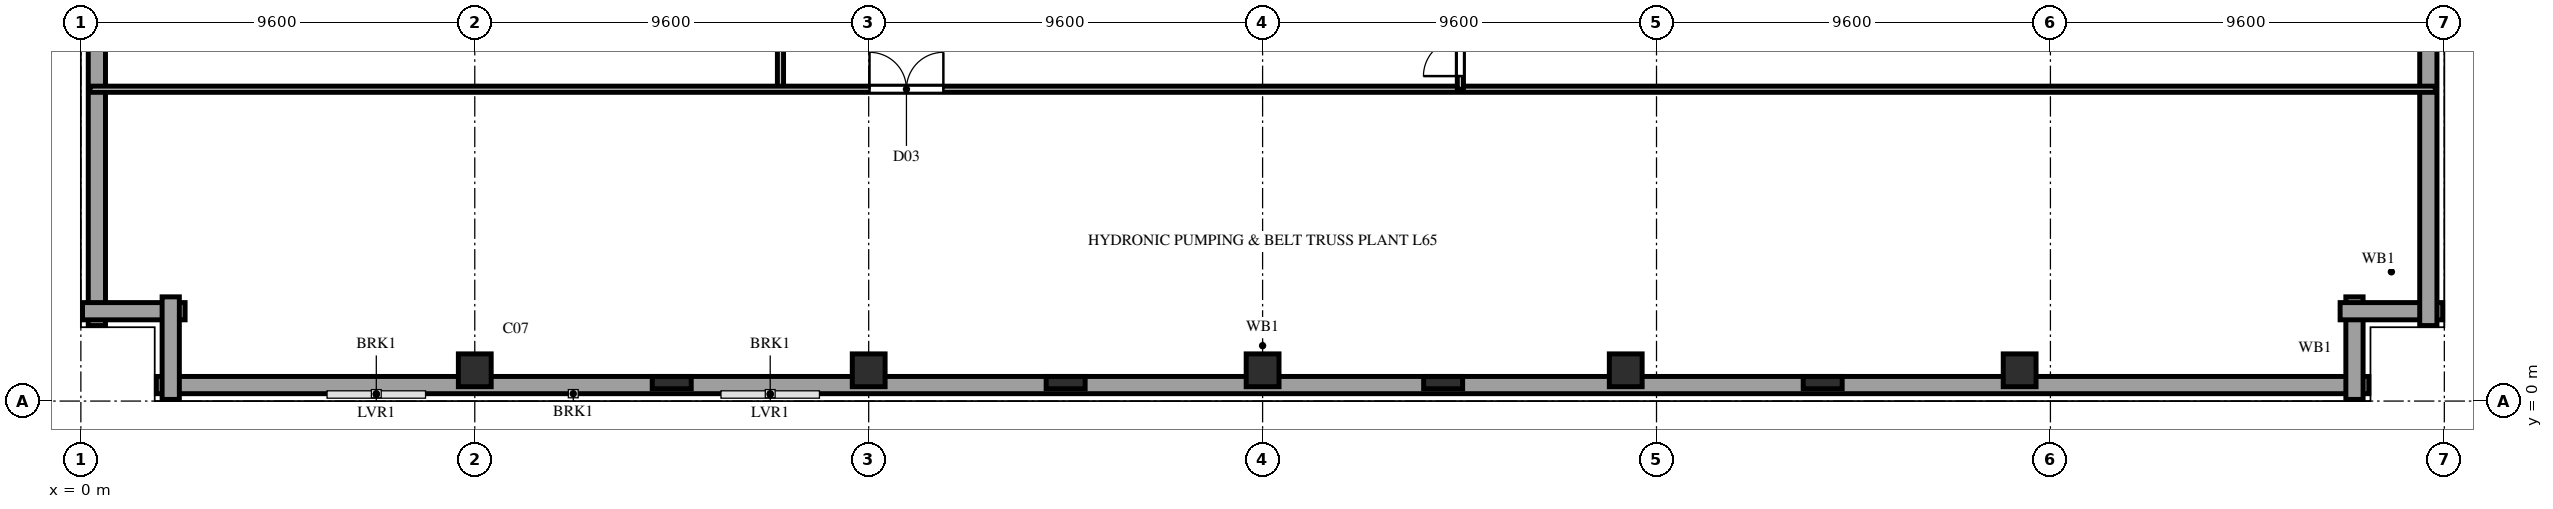
"""IFC4 building model, lengths in metres.
Left out: names, types, materials, properties, quantities, classifications, styles, units other than length and angle.
Written with IfcOpenShell. Run it as: python <this file> out.ifc"""

import sys

from ifc_helpers import new_model, si_unit, direction, frame, frame_2d, origin, origin_2d, place, context, subcontext, project, spatial, rectangle, extrude, element, fill, save


model = new_model("IFC4")
c1 = context("Model", 3, precision=1e-05, world=origin(), true_north=direction((0.0, 1.0)))
c2 = subcontext(c1, "Body", "Model", "MODEL_VIEW")
j1 = project(units=[si_unit("LENGTHUNIT", "METRE"), si_unit("PLANEANGLEUNIT", "RADIAN")], contexts=[c1])
p1 = place(None, origin())
s1 = spatial("IfcSite", under=j1, at=p1, CompositionType="ELEMENT")
p2 = place(p1, origin())
s2 = spatial("IfcBuilding", under=s1, at=p2, CompositionType="ELEMENT")
p3 = place(p2, frame((0.0, 0.0, 256.0)))
s3 = spatial("IfcBuildingStorey", under=s2, at=p3, CompositionType="ELEMENT", Elevation=256.0)
for number, where, z_axis, x_axis in (
    (1, (9.6, 0.75, 0.0), (0.0, 0.0, 1.0), (1.0, 0.0, 0.0)),
    (2, (19.2, 0.75, 0.0), (0.0, 0.0, 1.0), (1.0, 0.0, 0.0)),
    (3, (28.8, 0.75, 0.0), (0.0, 0.0, 1.0), (1.0, 0.0, 0.0)),
    (4, (37.65, 0.75, 0.0), (0.0, 0.0, 1.0), (1.0, 0.0, 0.0)),
    (5, (47.25, 0.75, 0.0), (0.0, 0.0, 1.0), (1.0, 0.0, 0.0)),
):
    element("IfcColumn", number, at=place(p3, frame(where, z_axis=z_axis, x_axis=x_axis)), inside=s3, PredefinedType="COLUMN", context=c2, shape_type="SweptSolid", body=[
        extrude(rectangle(XDim=0.8, YDim=0.8, at=origin_2d()), origin(), (0.0, 0.0, 1.0), 5.0),
    ])
for number, where, z_axis, x_axis in (
    (6, (14.4, 0.45, 0.0), (0.0, 0.0, 1.0), (1.0, 0.0, 0.0)),
    (7, (24.0, 0.45, 0.0), (0.0, 0.0, 1.0), (1.0, 0.0, 0.0)),
    (8, (33.2, 0.45, 0.0), (0.0, 0.0, 1.0), (1.0, 0.0, 0.0)),
    (9, (42.45, 0.45, 0.0), (0.0, 0.0, 1.0), (1.0, 0.0, 0.0)),
):
    element("IfcColumn", number, at=place(p3, frame(where, z_axis=z_axis, x_axis=x_axis)), inside=s3, PredefinedType="PILASTER", context=c2, shape_type="SweptSolid", body=[
        extrude(rectangle(XDim=0.95, YDim=0.3, at=origin_2d()), origin(), (0.0, 0.0, 1.0), 5.0),
    ])
p4 = place(p3, frame((1.84, 0.39, 0.0), z_axis=(0.0, 0.0, 1.0), x_axis=(1.0, 0.0, 0.0)))
e10 = element("IfcWall", 10, at=p4, inside=s3, PredefinedType="SOLIDWALL", context=c2, shape_type="SweptSolid", body=[
    extrude(rectangle(XDim=53.92, YDim=0.42, at=frame_2d((26.96, 0.0))), origin(), (0.0, 0.0, 1.0), 4.74),
])
for number, where, z_axis, x_axis in (
    (11, (55.41, 0.04, 0.0), (0.0, 0.0, 1.0), (0.0, 1.0, 0.0)),
    (12, (55.06, 2.19, 0.0), (0.0, 0.0, 1.0), (1.0, 0.0, 0.0)),
):
    element("IfcWall", number, at=place(p3, frame(where, z_axis=z_axis, x_axis=x_axis)), inside=s3, PredefinedType="SOLIDWALL", context=c2, shape_type="SweptSolid", body=[
        extrude(rectangle(XDim=2.5, YDim=0.42, at=frame_2d((1.25, 0.0))), origin(), (0.0, 0.0, 1.0), 4.7),
    ])
p5 = place(p3, frame((57.21, 1.84, 0.0), z_axis=(0.0, 0.0, 1.0), x_axis=(0.0, 1.0, 0.0)))
e13 = element("IfcWall", 13, at=p5, inside=s3, PredefinedType="SOLIDWALL", context=c2, shape_type="SweptSolid", body=[
    extrude(rectangle(XDim=34.72, YDim=0.42, at=frame_2d((17.36, 0.0))), origin(), (0.0, 0.0, 1.0), 4.7),
])
p6 = place(p3, frame((0.39, 55.76, 0.0), z_axis=(0.0, 0.0, 1.0), x_axis=(0.0, -1.0, 0.0)))
e14 = element("IfcWall", 14, at=p6, inside=s3, PredefinedType="SOLIDWALL", context=c2, shape_type="SweptSolid", body=[
    extrude(rectangle(XDim=53.92, YDim=0.42, at=frame_2d((26.96, 0.0))), origin(), (0.0, 0.0, 1.0), 4.74),
])
for number, where, z_axis, x_axis in (
    (15, (0.04, 2.19, 0.0), (0.0, 0.0, 1.0), (1.0, 0.0, 0.0)),
    (16, (2.19, 2.54, 0.0), (0.0, 0.0, 1.0), (0.0, -1.0, 0.0)),
):
    element("IfcWall", number, at=place(p3, frame(where, z_axis=z_axis, x_axis=x_axis)), inside=s3, PredefinedType="SOLIDWALL", context=c2, shape_type="SweptSolid", body=[
        extrude(rectangle(XDim=2.5, YDim=0.42, at=frame_2d((1.25, 0.0))), origin(), (0.0, 0.0, 1.0), 4.74),
    ])
p7 = place(p3, frame((17.05, 7.6, 0.0), z_axis=(0.0, 0.0, 1.0), x_axis=(0.0, 1.0, 0.0)))
e17 = element("IfcWall", 17, at=p7, inside=s3, PredefinedType="PARTITIONING", context=c2, shape_type="SweptSolid", body=[
    extrude(rectangle(XDim=2.0, YDim=0.15, at=frame_2d((1.0, 0.0))), origin(), (0.0, 0.0, 1.0), 4.74),
])
p8 = place(p3, frame((0.22, 7.6, 0.0), z_axis=(0.0, 0.0, 1.0), x_axis=(1.0, 0.0, 0.0)))
e18 = element("IfcWall", 18, at=p8, inside=s3, PredefinedType="PARTITIONING", context=c2, shape_type="SweptSolid", body=[
    extrude(rectangle(XDim=57.16, YDim=0.15, at=frame_2d((28.58, 0.0))), origin(), (0.0, 0.0, 1.0), 4.74),
])
p9 = place(p8, frame((19.0, 0.0, 0.0)))
e19 = element("IfcOpeningElement", 19, at=p9, cuts=e18, PredefinedType="OPENING", context=c2, shape_type="SweptSolid", body=[
    extrude(rectangle(XDim=1.8, YDim=2.2, at=frame_2d((0.9, 1.1))), frame((0.0, 0.087, 0.0), z_axis=(0.0, -1.0, 0.0), x_axis=(1.0, 0.0, 0.0)), (0.0, 0.0, 1.0), 0.174),
])
p10 = place(p3, frame((33.62, 7.6, 0.0), z_axis=(0.0, 0.0, 1.0), x_axis=(0.0, 1.0, 0.0)))
e20 = element("IfcWall", 20, at=p10, inside=s3, PredefinedType="PARTITIONING", context=c2, shape_type="SweptSolid", body=[
    extrude(rectangle(XDim=2.45, YDim=0.15, at=frame_2d((1.225, 0.0))), origin(), (0.0, 0.0, 1.0), 4.74),
])
p11 = place(p10, frame((0.32, 0.0, 0.0)))
e21 = element("IfcOpeningElement", 21, at=p11, cuts=e20, PredefinedType="OPENING", context=c2, shape_type="SweptSolid", body=[
    extrude(rectangle(XDim=1.8, YDim=2.2, at=frame_2d((0.9, 1.1))), frame((0.0, 0.087, 0.0), z_axis=(0.0, -1.0, 0.0), x_axis=(1.0, 0.0, 0.0)), (0.0, 0.0, 1.0), 0.174),
])
p12 = place(p9, origin())
e22 = element("IfcDoor", 22, at=p12, inside=s3, OperationType="DOUBLE_DOOR_SINGLE_SWING", PredefinedType="DOOR", context=c2, shape_type="SweptSolid", body=[
    extrude(rectangle(XDim=1.8, YDim=2.2, at=frame_2d((0.9, 1.1))), frame((0.0, 0.025, 0.0), z_axis=(0.0, -1.0, 0.0), x_axis=(1.0, 0.0, 0.0)), (0.0, 0.0, 1.0), 0.05),
])
fill(e19, e22)
p13 = place(p11, origin())
e23 = element("IfcDoor", 23, at=p13, inside=s3, OperationType="DOUBLE_DOOR_SINGLE_SWING", PredefinedType="DOOR", context=c2, shape_type="SweptSolid", body=[
    extrude(rectangle(XDim=1.8, YDim=2.2, at=frame_2d((0.9, 1.1))), frame((0.0, 0.025, 0.0), z_axis=(0.0, -1.0, 0.0), x_axis=(1.0, 0.0, 0.0)), (0.0, 0.0, 1.0), 0.05),
])
fill(e21, e23)
save(model, sys.argv[1])
